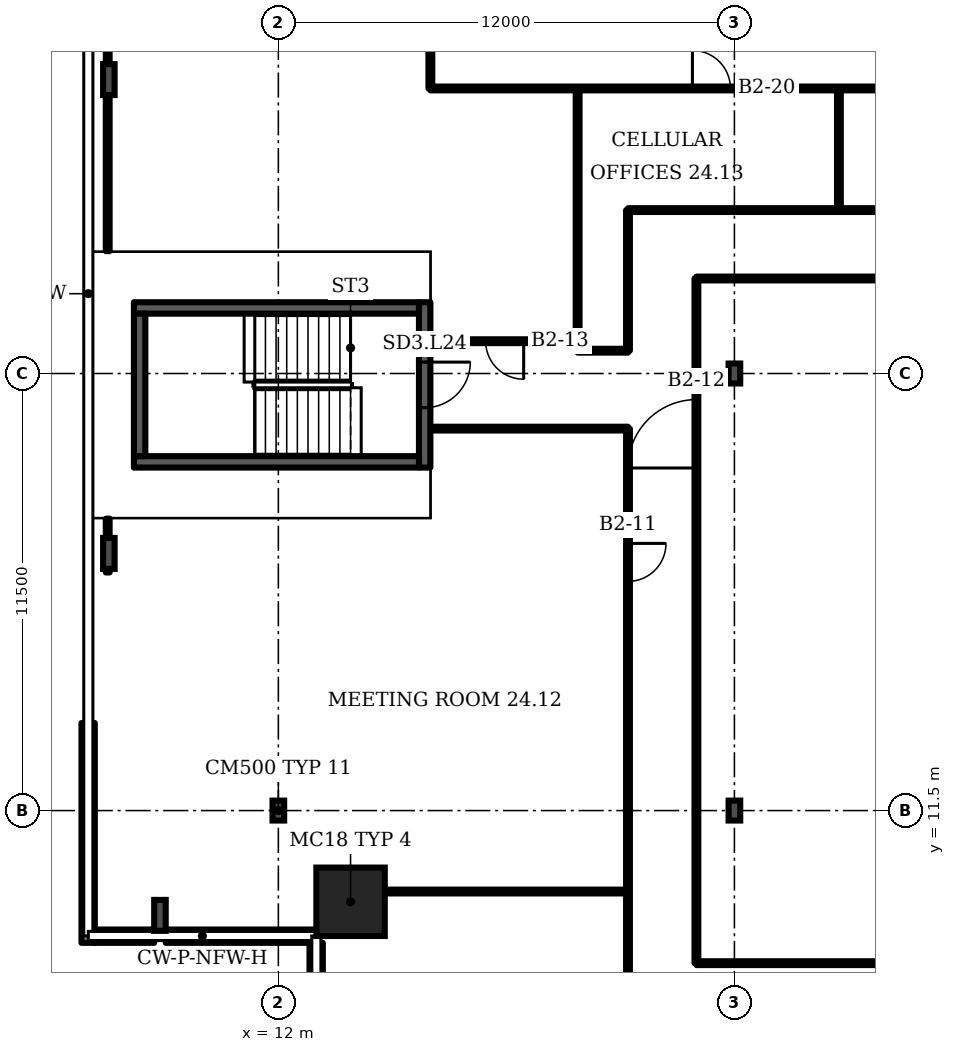
"""IFC4 building model, lengths in metres.
Left out: names, types, materials, properties, quantities, classifications, styles, units other than length and angle.
Written with IfcOpenShell. Run it as: python <this file> out.ifc"""

import sys

from ifc_helpers import new_model, si_unit, direction, frame, frame_2d, origin, origin_2d, place, context, subcontext, project, spatial, rectangle, i_section, extrude, element, fill, save


model = new_model("IFC4")
c1 = context("Model", 3, precision=1e-05, world=origin(), true_north=direction((0.0, 1.0)))
c2 = subcontext(c1, "Body", "Model", "MODEL_VIEW")
j1 = project(units=[si_unit("LENGTHUNIT", "METRE"), si_unit("PLANEANGLEUNIT", "RADIAN")], contexts=[c1])
p1 = place(None, origin())
s1 = spatial("IfcSite", under=j1, at=p1, CompositionType="ELEMENT")
p2 = place(p1, origin())
s2 = spatial("IfcBuilding", under=s1, at=p2, CompositionType="ELEMENT")
p3 = place(p2, frame((0.0, 0.0, 107.5)))
s3 = spatial("IfcBuildingStorey", under=s2, at=p3, CompositionType="ELEMENT", Elevation=107.5)
p4 = place(p3, frame((13.9, 9.1, 0.0), z_axis=(0.0, 0.0, 1.0), x_axis=(1.0, 0.0, 0.0)))
e1 = element("IfcColumn", 1, at=p4, inside=s3, PredefinedType="COLUMN", context=c2, shape_type="SweptSolid", body=[
    extrude(rectangle(XDim=1.8, YDim=1.8, at=origin_2d()), origin(), (0.0, 0.0, 1.0), 3.6),
])
for number, where, z_axis, x_axis in (
    (2, (7.54, 30.733, 0.0), (0.0, 0.0, 1.0), (-1.0, 0.0, 0.0)),
    (3, (7.54, 18.267, 0.0), (0.0, 0.0, 1.0), (-1.0, 0.0, 0.0)),
    (4, (8.885, 8.743, 0.0), (0.0, 0.0, 1.0), (-1.0, 0.0, 0.0)),
):
    element("IfcColumn", number, at=place(p3, frame(where, z_axis=z_axis, x_axis=x_axis)), inside=s3, PredefinedType="COLUMN", context=c2, shape_type="SweptSolid", body=[
        extrude(i_section(OverallWidth=0.303, OverallDepth=0.814, WebThickness=0.021, FlangeThickness=0.04, FilletRadius=0.03, at=origin_2d()), origin(), (0.0, 0.0, 1.0), 3.6),
    ])
for number, where, z_axis, x_axis in (
    (5, (12.0, 11.5, 0.0), (0.0, 0.0, 1.0), (1.0, 0.0, 0.0)),
    (6, (24.0, 11.5, 0.0), (0.0, 0.0, 1.0), (1.0, 0.0, 0.0)),
    (7, (24.0, 23.0, 0.0), (0.0, 0.0, 1.0), (1.0, 0.0, 0.0)),
):
    element("IfcColumn", number, at=place(p3, frame(where, z_axis=z_axis, x_axis=x_axis)), inside=s3, PredefinedType="COLUMN", context=c2, shape_type="SweptSolid", body=[
        extrude(i_section(OverallWidth=0.306, OverallDepth=0.524, WebThickness=0.021, FlangeThickness=0.04, FilletRadius=0.027, at=origin_2d()), origin(), (0.0, 0.0, 1.0), 3.6),
    ])
p5 = place(p3, frame((6.995, 13.803, 0.0), z_axis=(0.0, 0.0, 1.0), x_axis=(0.0, -1.0, 0.0)))
e8 = element("IfcWall", 8, at=p5, inside=s3, PredefinedType="SOLIDWALL", context=c2, shape_type="SweptSolid", body=[
    extrude(rectangle(XDim=5.783, YDim=0.35, at=frame_2d((2.892, 0.0))), origin(), (0.0, 0.0, 1.0), 1.0),
])
p6 = place(p3, frame((7.17, 8.195, 0.0), z_axis=(0.0, 0.0, 1.0), x_axis=(1.0, 0.0, 0.0)))
e9 = element("IfcWall", 9, at=p6, inside=s3, PredefinedType="SOLIDWALL", context=c2, shape_type="SweptSolid", body=[
    extrude(rectangle(XDim=1.563, YDim=0.35, at=frame_2d((0.782, 0.0))), origin(), (0.0, 0.0, 1.0), 1.0),
])
p7 = place(p3, frame((9.036, 8.195, 0.0), z_axis=(0.0, 0.0, 1.0), x_axis=(1.0, 0.0, 0.0)))
e10 = element("IfcWall", 10, at=p7, inside=s3, PredefinedType="SOLIDWALL", context=c2, shape_type="SweptSolid", body=[
    extrude(rectangle(XDim=3.964, YDim=0.35, at=frame_2d((1.982, 0.0))), origin(), (0.0, 0.0, 1.0), 1.0),
])
p8 = place(p3, frame((12.995, 8.02, 0.0), z_axis=(0.0, 0.0, 1.0), x_axis=(0.0, -1.0, 0.0)))
e11 = element("IfcWall", 11, at=p8, inside=s3, PredefinedType="SOLIDWALL", context=c2, shape_type="SweptSolid", body=[
    extrude(rectangle(XDim=6.161, YDim=0.35, at=frame_2d((3.081, 0.0))), origin(), (0.0, 0.0, 1.0), 1.0),
])
p9 = place(p3, frame((15.85, 20.525, 0.0), z_axis=(0.0, 0.0, 1.0), x_axis=(0.0, 1.0, 0.0)))
e12 = element("IfcWall", 12, at=p9, inside=s3, PredefinedType="SHEAR", context=c2, shape_type="SweptSolid", body=[
    extrude(rectangle(XDim=4.35, YDim=0.3, at=frame_2d((2.175, 0.0))), origin(), (0.0, 0.0, 1.0), 3.2),
])
p10 = place(p9, frame((1.575, 0.0, 0.0)))
e13 = element("IfcOpeningElement", 13, at=p10, cuts=e12, PredefinedType="OPENING", context=c2, shape_type="SweptSolid", body=[
    extrude(rectangle(XDim=1.2, YDim=2.1, at=frame_2d((0.6, 1.05))), frame((0.0, 0.16, 0.0), z_axis=(0.0, -1.0, 0.0), x_axis=(1.0, 0.0, 0.0)), (0.0, 0.0, 1.0), 0.32),
])
p11 = place(p3, frame((7.51, 17.765, 0.0), z_axis=(0.0, 0.0, 1.0), x_axis=(0.0, 1.0, 0.0)))
e14 = element("IfcWall", 14, at=p11, inside=s3, PredefinedType="PARTITIONING", context=c2, shape_type="SweptSolid", body=[
    extrude(rectangle(XDim=1.415, YDim=0.1, at=frame_2d((0.708, 0.0))), origin(), (0.0, 0.0, 1.0), 2.58),
])
p12 = place(p3, frame((7.51, 26.22, 0.0), z_axis=(0.0, 0.0, 1.0), x_axis=(0.0, 1.0, 0.0)))
e15 = element("IfcWall", 15, at=p12, inside=s3, PredefinedType="PARTITIONING", context=c2, shape_type="SweptSolid", body=[
    extrude(rectangle(XDim=15.76, YDim=0.1, at=frame_2d((7.88, 0.0))), origin(), (0.0, 0.0, 1.0), 2.58),
])
p13 = place(p3, frame((14.81, 9.37, 0.0), z_axis=(0.0, 0.0, 1.0), x_axis=(1.0, 0.0, 0.0)))
e16 = element("IfcWall", 16, at=p13, inside=s3, PredefinedType="PARTITIONING", context=c2, shape_type="SweptSolid", body=[
    extrude(rectangle(XDim=6.39, YDim=0.1, at=frame_2d((3.195, 0.0))), origin(), (0.0, 0.0, 1.0), 3.2),
])
p14 = place(p3, frame((16.0, 30.5, 0.0), z_axis=(0.0, 0.0, 1.0), x_axis=(0.0, 1.0, 0.0)))
e17 = element("IfcWall", 17, at=p14, inside=s3, PredefinedType="PARTITIONING", context=c2, shape_type="SweptSolid", body=[
    extrude(rectangle(XDim=3.48, YDim=0.1, at=frame_2d((1.74, 0.0))), origin(), (0.0, 0.0, 1.0), 3.2),
])
p15 = place(p3, frame((16.0, 30.5, 0.0), z_axis=(0.0, 0.0, 1.0), x_axis=(1.0, 0.0, 0.0)))
e18 = element("IfcWall", 18, at=p15, inside=s3, PredefinedType="PARTITIONING", context=c2, shape_type="SweptSolid", body=[
    extrude(rectangle(XDim=20.85, YDim=0.1, at=frame_2d((10.425, 0.0))), origin(), (0.0, 0.0, 1.0), 3.2),
])
p16 = place(p15, frame((6.895, 0.0, 0.0)))
e19 = element("IfcOpeningElement", 19, at=p16, cuts=e18, PredefinedType="OPENING", context=c2, shape_type="SweptSolid", body=[
    extrude(rectangle(XDim=1.0, YDim=2.1, at=frame_2d((0.5, 1.05))), frame((0.0, 0.06, 0.0), z_axis=(0.0, -1.0, 0.0), x_axis=(1.0, 0.0, 0.0)), (0.0, 0.0, 1.0), 0.12),
])
p17 = place(p15, frame((15.37, 0.0, 0.0)))
e20 = element("IfcOpeningElement", 20, at=p17, cuts=e18, PredefinedType="OPENING", context=c2, shape_type="SweptSolid", body=[
    extrude(rectangle(XDim=1.0, YDim=2.1, at=frame_2d((0.5, 1.05))), frame((0.0, 0.06, 0.0), z_axis=(0.0, -1.0, 0.0), x_axis=(1.0, 0.0, 0.0)), (0.0, 0.0, 1.0), 0.12),
])
p18 = place(p3, frame((16.02, 21.55, 0.0), z_axis=(0.0, 0.0, 1.0), x_axis=(1.0, 0.0, 0.0)))
e21 = element("IfcWall", 21, at=p18, inside=s3, PredefinedType="PARTITIONING", context=c2, shape_type="SweptSolid", body=[
    extrude(rectangle(XDim=5.18, YDim=0.1, at=frame_2d((2.59, 0.0))), origin(), (0.0, 0.0, 1.0), 3.2),
])
p19 = place(p3, frame((16.02, 23.85, 0.0), z_axis=(0.0, 0.0, 1.0), x_axis=(1.0, 0.0, 0.0)))
e22 = element("IfcWall", 22, at=p19, inside=s3, PredefinedType="PARTITIONING", context=c2, shape_type="SweptSolid", body=[
    extrude(rectangle(XDim=3.855, YDim=0.1, at=frame_2d((1.927, 0.0))), origin(), (0.0, 0.0, 1.0), 3.2),
])
p20 = place(p19, frame((1.435, 0.0, 0.0)))
e23 = element("IfcOpeningElement", 23, at=p20, cuts=e22, PredefinedType="OPENING", context=c2, shape_type="SweptSolid", body=[
    extrude(rectangle(XDim=1.0, YDim=2.1, at=frame_2d((0.5, 1.05))), frame((0.0, 0.06, 0.0), z_axis=(0.0, -1.0, 0.0), x_axis=(1.0, 0.0, 0.0)), (0.0, 0.0, 1.0), 0.12),
])
p21 = place(p3, frame((19.875, 23.6, 0.0), z_axis=(0.0, 0.0, 1.0), x_axis=(0.0, 1.0, 0.0)))
e24 = element("IfcWall", 24, at=p21, inside=s3, PredefinedType="PARTITIONING", context=c2, shape_type="SweptSolid", body=[
    extrude(rectangle(XDim=6.9, YDim=0.1, at=frame_2d((3.45, 0.0))), origin(), (0.0, 0.0, 1.0), 3.2),
])
p22 = place(p3, frame((19.875, 23.6, 0.0), z_axis=(0.0, 0.0, 1.0), x_axis=(1.0, 0.0, 0.0)))
e25 = element("IfcWall", 25, at=p22, inside=s3, PredefinedType="PARTITIONING", context=c2, shape_type="SweptSolid", body=[
    extrude(rectangle(XDim=1.325, YDim=0.1, at=frame_2d((0.663, 0.0))), origin(), (0.0, 0.0, 1.0), 3.2),
])
p23 = place(p3, frame((21.2, 5.68, 0.0), z_axis=(0.0, 0.0, 1.0), x_axis=(0.0, 1.0, 0.0)))
e26 = element("IfcWall", 26, at=p23, inside=s3, PredefinedType="PARTITIONING", context=c2, shape_type="SweptSolid", body=[
    extrude(rectangle(XDim=15.87, YDim=0.1, at=frame_2d((7.935, 0.0))), origin(), (0.0, 0.0, 1.0), 3.2),
])
p24 = place(p23, frame((11.85, 0.0, 0.0)))
e27 = element("IfcOpeningElement", 27, at=p24, cuts=e26, PredefinedType="OPENING", context=c2, shape_type="SweptSolid", body=[
    extrude(rectangle(XDim=1.0, YDim=2.1, at=frame_2d((0.5, 1.05))), frame((0.0, 0.06, 0.0), z_axis=(0.0, -1.0, 0.0), x_axis=(1.0, 0.0, 0.0)), (0.0, 0.0, 1.0), 0.12),
])
p25 = place(p3, frame((21.2, 23.6, 0.0), z_axis=(0.0, 0.0, 1.0), x_axis=(0.0, 1.0, 0.0)))
e28 = element("IfcWall", 28, at=p25, inside=s3, PredefinedType="PARTITIONING", context=c2, shape_type="SweptSolid", body=[
    extrude(rectangle(XDim=3.7, YDim=0.1, at=frame_2d((1.85, 0.0))), origin(), (0.0, 0.0, 1.0), 3.2),
])
p26 = place(p3, frame((21.2, 27.3, 0.0), z_axis=(0.0, 0.0, 1.0), x_axis=(1.0, 0.0, 0.0)))
e29 = element("IfcWall", 29, at=p26, inside=s3, PredefinedType="PARTITIONING", context=c2, shape_type="SweptSolid", body=[
    extrude(rectangle(XDim=42.4, YDim=0.1, at=frame_2d((21.2, 0.0))), origin(), (0.0, 0.0, 1.0), 3.2),
])
p27 = place(p26, frame((22.275, 0.0, 0.0)))
e30 = element("IfcOpeningElement", 30, at=p27, cuts=e29, PredefinedType="OPENING", context=c2, shape_type="SweptSolid", body=[
    extrude(rectangle(XDim=1.0, YDim=2.1, at=frame_2d((0.5, 1.05))), frame((0.0, 0.06, 0.0), z_axis=(0.0, -1.0, 0.0), x_axis=(1.0, 0.0, 0.0)), (0.0, 0.0, 1.0), 0.12),
])
p28 = place(p26, frame((27.73, 0.0, 0.0)))
e31 = element("IfcOpeningElement", 31, at=p28, cuts=e29, PredefinedType="OPENING", context=c2, shape_type="SweptSolid", body=[
    extrude(rectangle(XDim=1.0, YDim=2.1, at=frame_2d((0.5, 1.05))), frame((0.0, 0.06, 0.0), z_axis=(0.0, -1.0, 0.0), x_axis=(1.0, 0.0, 0.0)), (0.0, 0.0, 1.0), 0.12),
])
p29 = place(p26, frame((31.785, 0.0, 0.0)))
e32 = element("IfcOpeningElement", 32, at=p29, cuts=e29, PredefinedType="OPENING", context=c2, shape_type="SweptSolid", body=[
    extrude(rectangle(XDim=1.0, YDim=2.1, at=frame_2d((0.5, 1.05))), frame((0.0, 0.06, 0.0), z_axis=(0.0, -1.0, 0.0), x_axis=(1.0, 0.0, 0.0)), (0.0, 0.0, 1.0), 0.12),
])
p30 = place(p26, frame((35.845, 0.0, 0.0)))
e33 = element("IfcOpeningElement", 33, at=p30, cuts=e29, PredefinedType="OPENING", context=c2, shape_type="SweptSolid", body=[
    extrude(rectangle(XDim=1.0, YDim=2.1, at=frame_2d((0.5, 1.05))), frame((0.0, 0.06, 0.0), z_axis=(0.0, -1.0, 0.0), x_axis=(1.0, 0.0, 0.0)), (0.0, 0.0, 1.0), 0.12),
])
p31 = place(p26, frame((39.9, 0.0, 0.0)))
e34 = element("IfcOpeningElement", 34, at=p31, cuts=e29, PredefinedType="OPENING", context=c2, shape_type="SweptSolid", body=[
    extrude(rectangle(XDim=1.0, YDim=2.1, at=frame_2d((0.5, 1.05))), frame((0.0, 0.06, 0.0), z_axis=(0.0, -1.0, 0.0), x_axis=(1.0, 0.0, 0.0)), (0.0, 0.0, 1.0), 0.12),
])
p32 = place(p3, frame((23.0, 7.485, 0.0), z_axis=(0.0, 0.0, 1.0), x_axis=(0.0, 1.0, 0.0)))
e35 = element("IfcWall", 35, at=p32, inside=s3, PredefinedType="PARTITIONING", context=c2, shape_type="SweptSolid", body=[
    extrude(rectangle(XDim=18.015, YDim=0.1, at=frame_2d((9.007, 0.0))), origin(), (0.0, 0.0, 1.0), 3.2),
])
p33 = place(p32, frame((13.029, 0.0, 0.0)))
e36 = element("IfcOpeningElement", 36, at=p33, cuts=e35, PredefinedType="OPENING", context=c2, shape_type="SweptSolid", body=[
    extrude(rectangle(XDim=1.8, YDim=2.1, at=frame_2d((0.9, 1.05))), frame((0.0, 0.06, 0.0), z_axis=(0.0, -1.0, 0.0), x_axis=(1.0, 0.0, 0.0)), (0.0, 0.0, 1.0), 0.12),
])
p34 = place(p3, frame((23.0, 7.485, 0.0), z_axis=(0.0, 0.0, 1.0), x_axis=(1.0, 0.0, 0.0)))
e37 = element("IfcWall", 37, at=p34, inside=s3, PredefinedType="PARTITIONING", context=c2, shape_type="SweptSolid", body=[
    extrude(rectangle(XDim=13.61, YDim=0.1, at=frame_2d((6.805, 0.0))), origin(), (0.0, 0.0, 1.0), 3.2),
])
p35 = place(p3, frame((23.0, 25.5, 0.0), z_axis=(0.0, 0.0, 1.0), x_axis=(1.0, 0.0, 0.0)))
e38 = element("IfcWall", 38, at=p35, inside=s3, PredefinedType="PARTITIONING", context=c2, shape_type="SweptSolid", body=[
    extrude(rectangle(XDim=44.49, YDim=0.1, at=frame_2d((22.245, 0.0))), origin(), (0.0, 0.0, 1.0), 3.2),
])
p36 = place(p3, frame((26.75, 27.3, 0.0), z_axis=(0.0, 0.0, 1.0), x_axis=(0.0, 1.0, 0.0)))
e39 = element("IfcWall", 39, at=p36, inside=s3, PredefinedType="PARTITIONING", context=c2, shape_type="SweptSolid", body=[
    extrude(rectangle(XDim=3.2, YDim=0.1, at=frame_2d((1.6, 0.0))), origin(), (0.0, 0.0, 1.0), 3.2),
])
for number, where, z_axis, x_axis in (
    (40, (8.2, 20.675, 0.0), (0.0, 0.0, 1.0), (1.0, 0.0, 0.0)),
    (41, (8.2, 24.725, 0.0), (0.0, 0.0, 1.0), (1.0, 0.0, 0.0)),
):
    element("IfcWall", number, at=place(p3, frame(where, z_axis=z_axis, x_axis=x_axis)), inside=s3, PredefinedType="SHEAR", context=c2, shape_type="SweptSolid", body=[
        extrude(rectangle(XDim=7.5, YDim=0.3, at=frame_2d((3.75, 0.0))), origin(), (0.0, 0.0, 1.0), 3.2),
    ])
p37 = place(p3, frame((8.35, 20.825, 0.0), z_axis=(0.0, 0.0, 1.0), x_axis=(0.0, 1.0, 0.0)))
e42 = element("IfcWall", 42, at=p37, inside=s3, PredefinedType="SHEAR", context=c2, shape_type="SweptSolid", body=[
    extrude(rectangle(XDim=3.75, YDim=0.3, at=frame_2d((1.875, 0.0))), origin(), (0.0, 0.0, 1.0), 3.2),
])
p38 = place(p10, origin())
e43 = element("IfcDoor", 43, at=p38, inside=s3, OperationType="SINGLE_SWING_RIGHT", PredefinedType="DOOR", context=c2, shape_type="SweptSolid", body=[
    extrude(rectangle(XDim=1.2, YDim=2.1, at=frame_2d((0.6, 1.05))), frame((0.0, 0.025, 0.0), z_axis=(0.0, -1.0, 0.0), x_axis=(1.0, 0.0, 0.0)), (0.0, 0.0, 1.0), 0.05),
])
fill(e13, e43)
p39 = place(p24, origin())
e44 = element("IfcDoor", 44, at=p39, inside=s3, OperationType="SINGLE_SWING_RIGHT", PredefinedType="DOOR", context=c2, shape_type="SweptSolid", body=[
    extrude(rectangle(XDim=1.0, YDim=2.1, at=frame_2d((0.5, 1.05))), frame((0.0, 0.025, 0.0), z_axis=(0.0, -1.0, 0.0), x_axis=(1.0, 0.0, 0.0)), (0.0, 0.0, 1.0), 0.05),
])
fill(e27, e44)
p40 = place(p33, origin())
e45 = element("IfcDoor", 45, at=p40, inside=s3, OperationType="DOUBLE_DOOR_SINGLE_SWING", PredefinedType="DOOR", context=c2, shape_type="SweptSolid", body=[
    extrude(rectangle(XDim=1.8, YDim=2.1, at=frame_2d((0.9, 1.05))), frame((0.0, 0.025, 0.0), z_axis=(0.0, -1.0, 0.0), x_axis=(1.0, 0.0, 0.0)), (0.0, 0.0, 1.0), 0.05),
])
fill(e36, e45)
p41 = place(p20, origin())
e46 = element("IfcDoor", 46, at=p41, inside=s3, OperationType="SINGLE_SWING_RIGHT", PredefinedType="DOOR", context=c2, shape_type="SweptSolid", body=[
    extrude(rectangle(XDim=1.0, YDim=2.1, at=frame_2d((0.5, 1.05))), frame((0.0, 0.025, 0.0), z_axis=(0.0, -1.0, 0.0), x_axis=(1.0, 0.0, 0.0)), (0.0, 0.0, 1.0), 0.05),
])
fill(e23, e46)
p42 = place(p16, origin())
e47 = element("IfcDoor", 47, at=p42, inside=s3, OperationType="SINGLE_SWING_LEFT", PredefinedType="DOOR", context=c2, shape_type="SweptSolid", body=[
    extrude(rectangle(XDim=1.0, YDim=2.1, at=frame_2d((0.5, 1.05))), frame((0.0, 0.025, 0.0), z_axis=(0.0, -1.0, 0.0), x_axis=(1.0, 0.0, 0.0)), (0.0, 0.0, 1.0), 0.05),
])
fill(e19, e47)
save(model, sys.argv[1])
